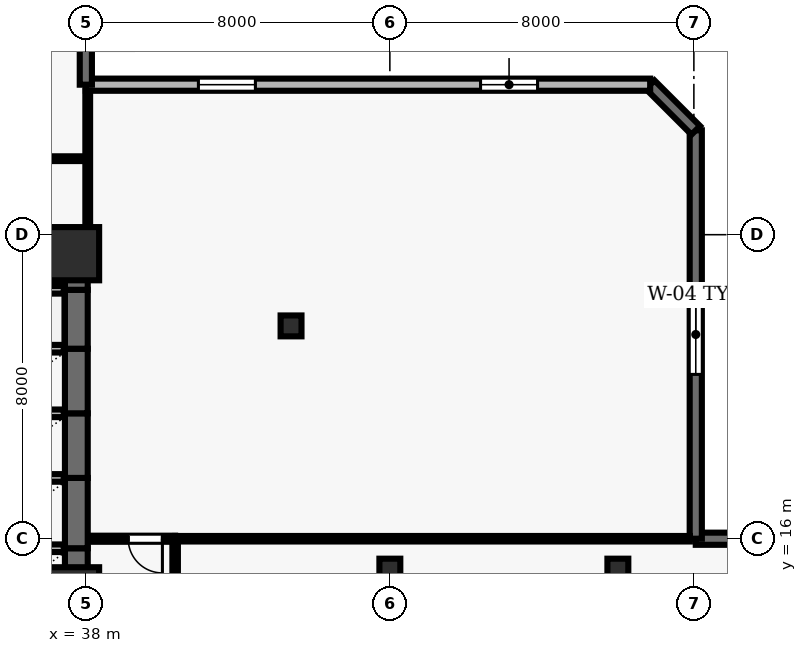
"""IFC4 building model, lengths in metres.
Left out: names, types, materials, properties, quantities, classifications, styles, units other than length and angle.
Written with IfcOpenShell. Run it as: python <this file> out.ifc"""

import sys

from ifc_helpers import new_model, si_unit, direction, frame, frame_2d, origin, origin_2d, place, context, subcontext, project, spatial, rectangle, hollow_rectangle, extrude, element, fill, save


model = new_model("IFC4")
c1 = context("Model", 3, precision=1e-05, world=origin(), true_north=direction((0.0, 1.0)))
c2 = subcontext(c1, "Body", "Model", "MODEL_VIEW")
j1 = project(units=[si_unit("LENGTHUNIT", "METRE"), si_unit("PLANEANGLEUNIT", "RADIAN")], contexts=[c1])
p1 = place(None, origin())
s1 = spatial("IfcSite", under=j1, at=p1, CompositionType="ELEMENT")
p2 = place(p1, origin())
s2 = spatial("IfcBuilding", under=s1, at=p2, CompositionType="ELEMENT")
p3 = place(p2, frame((0.0, 0.0, 46.6)))
s3 = spatial("IfcBuildingStorey", under=s2, at=p3, CompositionType="ELEMENT", Elevation=46.6)
for number, where, z_axis, x_axis in (
    (1, (37.65, 14.55, 0.0), (0.0, 0.0, 1.0), (1.0, 0.0, 0.0)),
    (2, (37.65, 23.5, 0.0), (0.0, 0.0, 1.0), (1.0, 0.0, 0.0)),
):
    element("IfcColumn", number, at=place(p3, frame(where, z_axis=z_axis, x_axis=x_axis)), inside=s3, PredefinedType="COLUMN", context=c2, shape_type="SweptSolid", body=[
        extrude(rectangle(XDim=1.4, YDim=1.4, at=origin_2d()), origin(), (0.0, 0.0, 1.0), 3.9),
    ])
for number, where, z_axis, x_axis in (
    (3, (46.0, 15.2, 0.0), (0.0, 0.0, 1.0), (1.0, 0.0, 0.0)),
    (4, (52.0, 15.2, 0.0), (0.0, 0.0, 1.0), (1.0, 0.0, 0.0)),
    (5, (43.4, 21.6, 0.0), (0.0, 0.0, 1.0), (1.0, 0.0, 0.0)),
):
    element("IfcColumn", number, at=place(p3, frame(where, z_axis=z_axis, x_axis=x_axis)), inside=s3, PredefinedType="COLUMN", context=c2, shape_type="SweptSolid", body=[
        extrude(hollow_rectangle(XDim=0.55, YDim=0.55, WallThickness=0.025, at=origin_2d()), origin(), (0.0, 0.0, 1.0), 3.9),
    ])
p4 = place(p3, frame((73.5, 16.0, 0.0), z_axis=(0.0, 0.0, 1.0), x_axis=(-1.0, 0.0, 0.0)))
e6 = element("IfcWall", 6, at=p4, inside=s3, PredefinedType="SOLIDWALL", context=c2, shape_type="SweptSolid", body=[
    extrude(rectangle(XDim=19.45, YDim=0.32, at=frame_2d((9.725, 0.0))), origin(), (0.0, 0.0, 1.0), 3.69),
])
p5 = place(p4, frame((6.925, 0.0, 0.0)))
e7 = element("IfcOpeningElement", 7, at=p5, cuts=e6, PredefinedType="OPENING", context=c2, shape_type="SweptSolid", body=[
    extrude(rectangle(XDim=1.0, YDim=2.2, at=frame_2d((0.5, 1.1))), frame((0.0, 0.17, 0.0), z_axis=(0.0, -1.0, 0.0), x_axis=(1.0, 0.0, 0.0)), (0.0, 0.0, 1.0), 0.34),
])
p6 = place(p4, frame((2.342, 0.0, 0.9)))
e8 = element("IfcOpeningElement", 8, at=p6, cuts=e6, PredefinedType="OPENING", context=c2, shape_type="SweptSolid", body=[
    extrude(rectangle(XDim=1.8, YDim=1.6, at=frame_2d((0.9, 0.8))), frame((0.0, 0.17, 0.0), z_axis=(0.0, -1.0, 0.0), x_axis=(1.0, 0.0, 0.0)), (0.0, 0.0, 1.0), 0.34),
])
p7 = place(p3, frame((54.05, 16.0, 0.0), z_axis=(0.0, 0.0, 1.0), x_axis=(0.0, 1.0, 0.0)))
e9 = element("IfcWall", 9, at=p7, inside=s3, PredefinedType="SOLIDWALL", context=c2, shape_type="SweptSolid", body=[
    extrude(rectangle(XDim=10.747, YDim=0.32, at=frame_2d((5.374, 0.0))), origin(), (0.0, 0.0, 1.0), 3.69),
])
p8 = place(p7, frame((4.324, 0.0, 0.9)))
e10 = element("IfcOpeningElement", 10, at=p8, cuts=e9, PredefinedType="OPENING", context=c2, shape_type="SweptSolid", body=[
    extrude(rectangle(XDim=2.1, YDim=1.6, at=frame_2d((1.05, 0.8))), frame((0.0, 0.17, 0.0), z_axis=(0.0, -1.0, 0.0), x_axis=(1.0, 0.0, 0.0)), (0.0, 0.0, 1.0), 0.34),
])
p9 = place(p3, frame((54.05, 26.747, 0.0), z_axis=(0.0, 0.0, 1.0), x_axis=(-0.707106781187, 0.707106781187, 0.0)))
e11 = element("IfcWall", 11, at=p9, inside=s3, PredefinedType="SOLIDWALL", context=c2, shape_type="SweptSolid", body=[
    extrude(rectangle(XDim=1.697, YDim=0.32, at=frame_2d((0.849, 0.0))), origin(), (0.0, 0.0, 1.0), 3.69),
])
p10 = place(p3, frame((52.85, 27.947, 0.0), z_axis=(0.0, 0.0, 1.0), x_axis=(-1.0, 0.0, 0.0)))
e12 = element("IfcWall", 12, at=p10, inside=s3, PredefinedType="SOLIDWALL", context=c2, shape_type="SweptSolid", body=[
    extrude(rectangle(XDim=14.85, YDim=0.32, at=frame_2d((7.425, 0.0))), origin(), (0.0, 0.0, 1.0), 3.69),
])
p11 = place(p10, frame((2.963, 0.0, 0.9)))
e13 = element("IfcOpeningElement", 13, at=p11, cuts=e12, PredefinedType="OPENING", context=c2, shape_type="SweptSolid", body=[
    extrude(rectangle(XDim=1.5, YDim=1.8, at=frame_2d((0.75, 0.9))), frame((0.0, 0.17, 0.0), z_axis=(0.0, -1.0, 0.0), x_axis=(1.0, 0.0, 0.0)), (0.0, 0.0, 1.0), 0.34),
])
p12 = place(p10, frame((10.388, 0.0, 0.9)))
e14 = element("IfcOpeningElement", 14, at=p12, cuts=e12, PredefinedType="OPENING", context=c2, shape_type="SweptSolid", body=[
    extrude(rectangle(XDim=1.5, YDim=1.8, at=frame_2d((0.75, 0.9))), frame((0.0, 0.17, 0.0), z_axis=(0.0, -1.0, 0.0), x_axis=(1.0, 0.0, 0.0)), (0.0, 0.0, 1.0), 0.34),
])
p13 = place(p3, frame((38.0, 27.947, 0.0), z_axis=(0.0, 0.0, 1.0), x_axis=(0.0, 1.0, 0.0)))
e15 = element("IfcWall", 15, at=p13, inside=s3, PredefinedType="SOLIDWALL", context=c2, shape_type="SweptSolid", body=[
    extrude(rectangle(XDim=23.553, YDim=0.32, at=frame_2d((11.776, 0.0))), origin(), (0.0, 0.0, 1.0), 3.69),
])
p14 = place(p13, frame((10.276, 0.0, 0.0)))
e16 = element("IfcOpeningElement", 16, at=p14, cuts=e15, PredefinedType="OPENING", context=c2, shape_type="SweptSolid", body=[
    extrude(rectangle(XDim=1.0, YDim=2.2, at=frame_2d((0.5, 1.1))), frame((0.0, 0.17, 0.0), z_axis=(0.0, -1.0, 0.0), x_axis=(1.0, 0.0, 0.0)), (0.0, 0.0, 1.0), 0.34),
])
p15 = place(p13, frame((13.821, 0.0, 0.9)))
e17 = element("IfcOpeningElement", 17, at=p15, cuts=e15, PredefinedType="OPENING", context=c2, shape_type="SweptSolid", body=[
    extrude(rectangle(XDim=1.8, YDim=1.8, at=frame_2d((0.9, 0.9))), frame((0.0, 0.17, 0.0), z_axis=(0.0, -1.0, 0.0), x_axis=(1.0, 0.0, 0.0)), (0.0, 0.0, 1.0), 0.34),
])
p16 = place(p13, frame((19.709, 0.0, 0.9)))
e18 = element("IfcOpeningElement", 18, at=p16, cuts=e15, PredefinedType="OPENING", context=c2, shape_type="SweptSolid", body=[
    extrude(rectangle(XDim=1.8, YDim=1.8, at=frame_2d((0.9, 0.9))), frame((0.0, 0.17, 0.0), z_axis=(0.0, -1.0, 0.0), x_axis=(1.0, 0.0, 0.0)), (0.0, 0.0, 1.0), 0.34),
])
p17 = place(p3, frame((37.75, 13.9, 0.0), z_axis=(0.0, 0.0, 1.0), x_axis=(0.0, 1.0, 0.0)))
e19 = element("IfcWall", 19, at=p17, inside=s3, PredefinedType="SHEAR", context=c2, shape_type="SweptSolid", body=[
    extrude(rectangle(XDim=1.85, YDim=0.6, at=frame_2d((0.925, 0.0))), origin(), (0.0, 0.0, 1.0), 3.69),
])
p18 = place(p3, frame((37.42, 15.75, 0.0), z_axis=(0.0, 0.0, 1.0), x_axis=(-1.0, 0.0, 0.0)))
e20 = element("IfcWall", 20, at=p18, inside=s3, PredefinedType="SOLIDWALL", context=c2, shape_type="SweptSolid", body=[
    extrude(rectangle(XDim=2.14, YDim=0.2, at=frame_2d((1.07, 0.0))), origin(), (0.0, 0.0, 1.0), 3.69),
])
p19 = place(p3, frame((37.75, 15.75, 0.0), z_axis=(0.0, 0.0, 1.0), x_axis=(0.0, 1.0, 0.0)))
e21 = element("IfcWall", 21, at=p19, inside=s3, PredefinedType="SHEAR", context=c2, shape_type="SweptSolid", body=[
    extrude(rectangle(XDim=1.85, YDim=0.6, at=frame_2d((0.925, 0.0))), origin(), (0.0, 0.0, 1.0), 3.69),
])
p20 = place(p3, frame((37.42, 17.6, 0.0), z_axis=(0.0, 0.0, 1.0), x_axis=(-1.0, 0.0, 0.0)))
e22 = element("IfcWall", 22, at=p20, inside=s3, PredefinedType="SOLIDWALL", context=c2, shape_type="SweptSolid", body=[
    extrude(rectangle(XDim=2.14, YDim=0.2, at=frame_2d((1.07, 0.0))), origin(), (0.0, 0.0, 1.0), 3.69),
])
p21 = place(p3, frame((37.75, 17.6, 0.0), z_axis=(0.0, 0.0, 1.0), x_axis=(0.0, 1.0, 0.0)))
e23 = element("IfcWall", 23, at=p21, inside=s3, PredefinedType="SHEAR", context=c2, shape_type="SweptSolid", body=[
    extrude(rectangle(XDim=1.7, YDim=0.6, at=frame_2d((0.85, 0.0))), origin(), (0.0, 0.0, 1.0), 3.69),
])
p22 = place(p3, frame((37.42, 19.3, 0.0), z_axis=(0.0, 0.0, 1.0), x_axis=(-1.0, 0.0, 0.0)))
e24 = element("IfcWall", 24, at=p22, inside=s3, PredefinedType="SOLIDWALL", context=c2, shape_type="SweptSolid", body=[
    extrude(rectangle(XDim=2.14, YDim=0.2, at=frame_2d((1.07, 0.0))), origin(), (0.0, 0.0, 1.0), 3.69),
])
p23 = place(p3, frame((37.75, 19.3, 0.0), z_axis=(0.0, 0.0, 1.0), x_axis=(0.0, 1.0, 0.0)))
e25 = element("IfcWall", 25, at=p23, inside=s3, PredefinedType="SHEAR", context=c2, shape_type="SweptSolid", body=[
    extrude(rectangle(XDim=1.7, YDim=0.6, at=frame_2d((0.85, 0.0))), origin(), (0.0, 0.0, 1.0), 3.69),
])
p24 = place(p3, frame((37.42, 21.0, 0.0), z_axis=(0.0, 0.0, 1.0), x_axis=(-1.0, 0.0, 0.0)))
e26 = element("IfcWall", 26, at=p24, inside=s3, PredefinedType="SOLIDWALL", context=c2, shape_type="SweptSolid", body=[
    extrude(rectangle(XDim=2.14, YDim=0.2, at=frame_2d((1.07, 0.0))), origin(), (0.0, 0.0, 1.0), 3.69),
])
p25 = place(p3, frame((37.75, 21.0, 0.0), z_axis=(0.0, 0.0, 1.0), x_axis=(0.0, 1.0, 0.0)))
e27 = element("IfcWall", 27, at=p25, inside=s3, PredefinedType="SHEAR", context=c2, shape_type="SweptSolid", body=[
    extrude(rectangle(XDim=1.55, YDim=0.6, at=frame_2d((0.775, 0.0))), origin(), (0.0, 0.0, 1.0), 3.69),
])
p26 = place(p3, frame((37.42, 22.55, 0.0), z_axis=(0.0, 0.0, 1.0), x_axis=(-1.0, 0.0, 0.0)))
e28 = element("IfcWall", 28, at=p26, inside=s3, PredefinedType="SOLIDWALL", context=c2, shape_type="SweptSolid", body=[
    extrude(rectangle(XDim=2.14, YDim=0.2, at=frame_2d((1.07, 0.0))), origin(), (0.0, 0.0, 1.0), 3.69),
])
p27 = place(p3, frame((37.75, 22.55, 0.0), z_axis=(0.0, 0.0, 1.0), x_axis=(0.0, 1.0, 0.0)))
e29 = element("IfcWall", 29, at=p27, inside=s3, PredefinedType="SHEAR", context=c2, shape_type="SweptSolid", body=[
    extrude(rectangle(XDim=1.5, YDim=0.6, at=frame_2d((0.75, 0.0))), origin(), (0.0, 0.0, 1.0), 3.69),
])
p28 = place(p3, frame((37.42, 24.05, 0.0), z_axis=(0.0, 0.0, 1.0), x_axis=(-1.0, 0.0, 0.0)))
e30 = element("IfcWall", 30, at=p28, inside=s3, PredefinedType="SOLIDWALL", context=c2, shape_type="SweptSolid", body=[
    extrude(rectangle(XDim=2.14, YDim=0.2, at=frame_2d((1.07, 0.0))), origin(), (0.0, 0.0, 1.0), 3.69),
])
p29 = place(p3, frame((35.15, 26.0, 0.0), z_axis=(0.0, 0.0, 1.0), x_axis=(1.0, 0.0, 0.0)))
e31 = element("IfcWall", 31, at=p29, inside=s3, PredefinedType="PARTITIONING", context=c2, shape_type="SweptSolid", body=[
    extrude(rectangle(XDim=2.7, YDim=0.125, at=frame_2d((1.35, 0.0))), origin(), (0.0, 0.0, 1.0), 3.69),
])
p30 = place(p3, frame((40.35, 16.0, 0.0), z_axis=(0.0, 0.0, 1.0), x_axis=(1.0, 0.0, 0.0)))
e32 = element("IfcWall", 32, at=p30, inside=s3, PredefinedType="PARTITIONING", context=c2, shape_type="SweptSolid", body=[
    extrude(rectangle(XDim=13.545, YDim=0.145, at=frame_2d((6.772, 0.0))), origin(), (0.0, 0.0, 1.0), 3.39),
])
p31 = place(p3, frame((40.35, 16.0, 0.0), z_axis=(0.0, 0.0, 1.0), x_axis=(-1.0, 0.0, 0.0)))
e33 = element("IfcWall", 33, at=p31, inside=s3, PredefinedType="PARTITIONING", context=c2, shape_type="SweptSolid", body=[
    extrude(rectangle(XDim=2.27, YDim=0.16, at=frame_2d((1.135, 0.0))), origin(), (0.0, 0.0, 1.0), 3.69),
])
p32 = place(p31, frame((0.335, 0.0, 0.0)))
e34 = element("IfcOpeningElement", 34, at=p32, cuts=e33, PredefinedType="OPENING", context=c2, shape_type="SweptSolid", body=[
    extrude(rectangle(XDim=0.9, YDim=2.1, at=frame_2d((0.45, 1.05))), frame((0.0, 0.09, 0.0), z_axis=(0.0, -1.0, 0.0), x_axis=(1.0, 0.0, 0.0)), (0.0, 0.0, 1.0), 0.18),
])
p33 = place(p3, frame((38.05, 27.792, 0.0), z_axis=(0.0, 0.0, 1.0), x_axis=(0.0, -1.0, 0.0)))
e35 = element("IfcWall", 35, at=p33, inside=s3, PredefinedType="PARTITIONING", context=c2, shape_type="SweptSolid", body=[
    extrude(rectangle(XDim=3.742, YDim=0.125, at=frame_2d((1.871, 0.0))), origin(), (0.0, 0.0, 1.0), 2.995),
])
p34 = place(p3, frame((40.35, 10.418, 0.0), z_axis=(0.0, 0.0, 1.0), x_axis=(0.0, 1.0, 0.0)))
e36 = element("IfcWall", 36, at=p34, inside=s3, PredefinedType="PARTITIONING", context=c2, shape_type="SweptSolid", body=[
    extrude(rectangle(XDim=5.507, YDim=0.145, at=frame_2d((2.753, 0.0))), origin(), (0.0, 0.0, 1.0), 3.227),
])
p35 = place(p8, origin())
e37 = element("IfcWindow", 37, at=p35, inside=s3, PartitioningType="SINGLE_PANEL", PredefinedType="WINDOW", context=c2, shape_type="SweptSolid", body=[
    extrude(rectangle(XDim=2.1, YDim=1.6, at=frame_2d((1.05, 0.8))), frame((0.0, 0.03, 0.0), z_axis=(0.0, -1.0, 0.0), x_axis=(1.0, 0.0, 0.0)), (0.0, 0.0, 1.0), 0.06),
])
fill(e10, e37)
p36 = place(p11, origin())
e38 = element("IfcWindow", 38, at=p36, inside=s3, PartitioningType="SINGLE_PANEL", PredefinedType="WINDOW", context=c2, shape_type="SweptSolid", body=[
    extrude(rectangle(XDim=1.5, YDim=1.8, at=frame_2d((0.75, 0.9))), frame((0.0, 0.03, 0.0), z_axis=(0.0, -1.0, 0.0), x_axis=(1.0, 0.0, 0.0)), (0.0, 0.0, 1.0), 0.06),
])
fill(e13, e38)
p37 = place(p12, origin())
e39 = element("IfcWindow", 39, at=p37, inside=s3, PartitioningType="SINGLE_PANEL", PredefinedType="WINDOW", context=c2, shape_type="SweptSolid", body=[
    extrude(rectangle(XDim=1.5, YDim=1.8, at=frame_2d((0.75, 0.9))), frame((0.0, 0.03, 0.0), z_axis=(0.0, -1.0, 0.0), x_axis=(1.0, 0.0, 0.0)), (0.0, 0.0, 1.0), 0.06),
])
fill(e14, e39)
p38 = place(p32, origin())
e40 = element("IfcDoor", 40, at=p38, inside=s3, OperationType="SINGLE_SWING_LEFT", PredefinedType="DOOR", context=c2, shape_type="SweptSolid", body=[
    extrude(rectangle(XDim=0.9, YDim=2.1, at=frame_2d((0.45, 1.05))), frame((0.0, 0.025, 0.0), z_axis=(0.0, -1.0, 0.0), x_axis=(1.0, 0.0, 0.0)), (0.0, 0.0, 1.0), 0.05),
])
fill(e34, e40)
save(model, sys.argv[1])
